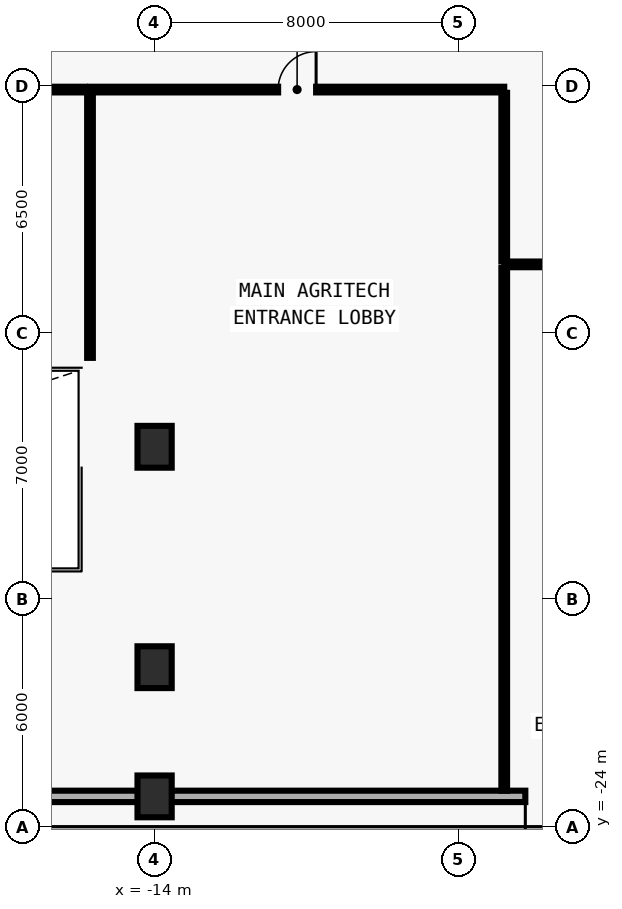
"""IFC4 building model, lengths in metres.
Left out: names, types, materials, properties, quantities, classifications, styles, units other than length and angle.
Written with IfcOpenShell. Run it as: python <this file> out.ifc"""

import sys

from ifc_helpers import new_model, si_unit, direction, frame, frame_2d, origin, origin_2d, place, context, subcontext, project, spatial, rectangle, extrude, element, fill, save


model = new_model("IFC4")
c1 = context("Model", 3, precision=1e-05, world=origin(), true_north=direction((0.0, 1.0)))
c2 = subcontext(c1, "Body", "Model", "MODEL_VIEW")
j1 = project(units=[si_unit("LENGTHUNIT", "METRE"), si_unit("PLANEANGLEUNIT", "RADIAN")], contexts=[c1])
p1 = place(None, origin())
s1 = spatial("IfcSite", under=j1, at=p1, CompositionType="ELEMENT")
p2 = place(p1, origin())
s2 = spatial("IfcBuilding", under=s1, at=p2, CompositionType="ELEMENT")
p3 = place(p2, origin())
s3 = spatial("IfcBuildingStorey", under=s2, at=p3, CompositionType="ELEMENT", Elevation=0.0)
for number, where, z_axis, x_axis in (
    (1, (-14.0, -23.2, 0.0), (0.0, 0.0, 1.0), (1.0, 0.0, 0.0)),
    (2, (-14.0, -19.8, 0.0), (0.0, 0.0, 1.0), (1.0, 0.0, 0.0)),
    (3, (-14.0, -14.0, 0.0), (0.0, 0.0, 1.0), (1.0, 0.0, 0.0)),
):
    element("IfcColumn", number, at=place(p3, frame(where, z_axis=z_axis, x_axis=x_axis)), inside=s3, PredefinedType="COLUMN", context=c2, shape_type="SweptSolid", body=[
        extrude(rectangle(XDim=0.9, YDim=1.1, at=origin_2d()), origin(), (0.0, 0.0, 1.0), 4.575),
    ])
p4 = place(p3, frame((32.755, -23.2, 0.0), z_axis=(0.0, 0.0, 1.0), x_axis=(-1.0, 0.0, 0.0)))
e4 = element("IfcWall", 4, at=p4, inside=s3, PredefinedType="SOLIDWALL", context=c2, shape_type="SweptSolid", body=[
    extrude(rectangle(XDim=65.51, YDim=0.3, at=frame_2d((32.755, 0.0))), origin(), (0.0, 0.0, 1.0), 3.35),
])
p5 = place(p4, frame((29.0, 0.0, 0.0)))
e5 = element("IfcOpeningElement", 5, at=p5, cuts=e4, PredefinedType="OPENING", context=c2, shape_type="SweptSolid", body=[
    extrude(rectangle(XDim=2.0, YDim=2.4, at=frame_2d((1.0, 1.2))), frame((0.0, 0.16, 0.0), z_axis=(0.0, -1.0, 0.0), x_axis=(1.0, 0.0, 0.0)), (0.0, 0.0, 1.0), 0.32),
])
p6 = place(p4, frame((35.0, 0.0, 0.0)))
e6 = element("IfcOpeningElement", 6, at=p6, cuts=e4, PredefinedType="OPENING", context=c2, shape_type="SweptSolid", body=[
    extrude(rectangle(XDim=2.0, YDim=2.4, at=frame_2d((1.0, 1.2))), frame((0.0, 0.16, 0.0), z_axis=(0.0, -1.0, 0.0), x_axis=(1.0, 0.0, 0.0)), (0.0, 0.0, 1.0), 0.32),
])
p7 = place(p3, frame((-15.7, -4.6, 0.0), z_axis=(0.0, 0.0, 1.0), x_axis=(1.0, 0.0, 0.0)))
e7 = element("IfcWall", 7, at=p7, inside=s3, PredefinedType="PARTITIONING", context=c2, shape_type="SweptSolid", body=[
    extrude(rectangle(XDim=10.9, YDim=0.15, at=frame_2d((5.45, 0.0))), origin(), (0.0, 0.0, 1.0), 4.28),
])
p8 = place(p7, frame((4.95, 0.0, 0.0)))
e8 = element("IfcOpeningElement", 8, at=p8, cuts=e7, PredefinedType="OPENING", context=c2, shape_type="SweptSolid", body=[
    extrude(rectangle(XDim=1.0, YDim=2.1, at=frame_2d((0.5, 1.05))), frame((0.0, 0.085, 0.0), z_axis=(0.0, -1.0, 0.0), x_axis=(1.0, 0.0, 0.0)), (0.0, 0.0, 1.0), 0.17),
])
p9 = place(p3, frame((-4.8, -9.2, 0.0), z_axis=(0.0, 0.0, 1.0), x_axis=(1.0, 0.0, 0.0)))
e9 = element("IfcWall", 9, at=p9, inside=s3, PredefinedType="PARTITIONING", context=c2, shape_type="SweptSolid", body=[
    extrude(rectangle(XDim=15.6, YDim=0.15, at=frame_2d((7.8, 0.0))), origin(), (0.0, 0.0, 1.0), 4.28),
])
p10 = place(p9, frame((7.3, 0.0, 0.0)))
e10 = element("IfcOpeningElement", 10, at=p10, cuts=e9, PredefinedType="OPENING", context=c2, shape_type="SweptSolid", body=[
    extrude(rectangle(XDim=1.0, YDim=2.1, at=frame_2d((0.5, 1.05))), frame((0.0, 0.085, 0.0), z_axis=(0.0, -1.0, 0.0), x_axis=(1.0, 0.0, 0.0)), (0.0, 0.0, 1.0), 0.17),
])
p11 = place(p3, frame((-33.05, -4.6, 0.0), z_axis=(0.0, 0.0, 1.0), x_axis=(1.0, 0.0, 0.0)))
e11 = element("IfcWall", 11, at=p11, inside=s3, PredefinedType="PARTITIONING", context=c2, shape_type="SweptSolid", body=[
    extrude(rectangle(XDim=17.215, YDim=0.15, at=frame_2d((8.607, 0.0))), origin(), (0.0, 0.0, 1.0), 4.28),
])
p12 = place(p11, frame((8.175, 0.0, 0.0)))
e12 = element("IfcOpeningElement", 12, at=p12, cuts=e11, PredefinedType="OPENING", context=c2, shape_type="SweptSolid", body=[
    extrude(rectangle(XDim=1.0, YDim=2.1, at=frame_2d((0.5, 1.05))), frame((0.0, 0.085, 0.0), z_axis=(0.0, -1.0, 0.0), x_axis=(1.0, 0.0, 0.0)), (0.0, 0.0, 1.0), 0.17),
])
p13 = place(p3, frame((-4.8, -4.685, 0.0), z_axis=(0.0, 0.0, 1.0), x_axis=(0.0, -1.0, 0.0)))
e13 = element("IfcWall", 13, at=p13, inside=s3, PredefinedType="PARTITIONING", context=c2, shape_type="SweptSolid", body=[
    extrude(rectangle(XDim=4.43, YDim=0.15, at=frame_2d((2.215, 0.0))), origin(), (0.0, 0.0, 1.0), 4.28),
])
p14 = place(p3, frame((-4.8, -9.285, 0.0), z_axis=(0.0, 0.0, 1.0), x_axis=(0.0, -1.0, 0.0)))
e14 = element("IfcWall", 14, at=p14, inside=s3, PredefinedType="PARTITIONING", context=c2, shape_type="SweptSolid", body=[
    extrude(rectangle(XDim=13.765, YDim=0.15, at=frame_2d((6.883, 0.0))), origin(), (0.0, 0.0, 1.0), 4.28),
])
p15 = place(p3, frame((-15.7, -11.66, 0.0), z_axis=(0.0, 0.0, 1.0), x_axis=(0.0, 1.0, 0.0)))
e15 = element("IfcWall", 15, at=p15, inside=s3, PredefinedType="PARTITIONING", context=c2, shape_type="SweptSolid", body=[
    extrude(rectangle(XDim=6.975, YDim=0.15, at=frame_2d((3.487, 0.0))), origin(), (0.0, 0.0, 1.0), 4.28),
])
p16 = place(p6, origin())
e16 = element("IfcDoor", 16, at=p16, inside=s3, OperationType="DOUBLE_DOOR_SINGLE_SWING", PredefinedType="DOOR", context=c2, shape_type="SweptSolid", body=[
    extrude(rectangle(XDim=2.0, YDim=2.4, at=frame_2d((1.0, 1.2))), frame((0.0, 0.025, 0.0), z_axis=(0.0, -1.0, 0.0), x_axis=(1.0, 0.0, 0.0)), (0.0, 0.0, 1.0), 0.05),
])
fill(e6, e16)
p17 = place(p8, origin())
e17 = element("IfcDoor", 17, at=p17, inside=s3, OperationType="SINGLE_SWING_RIGHT", PredefinedType="DOOR", context=c2, shape_type="SweptSolid", body=[
    extrude(rectangle(XDim=1.0, YDim=2.1, at=frame_2d((0.5, 1.05))), frame((0.0, 0.025, 0.0), z_axis=(0.0, -1.0, 0.0), x_axis=(1.0, 0.0, 0.0)), (0.0, 0.0, 1.0), 0.05),
])
fill(e8, e17)
save(model, sys.argv[1])
